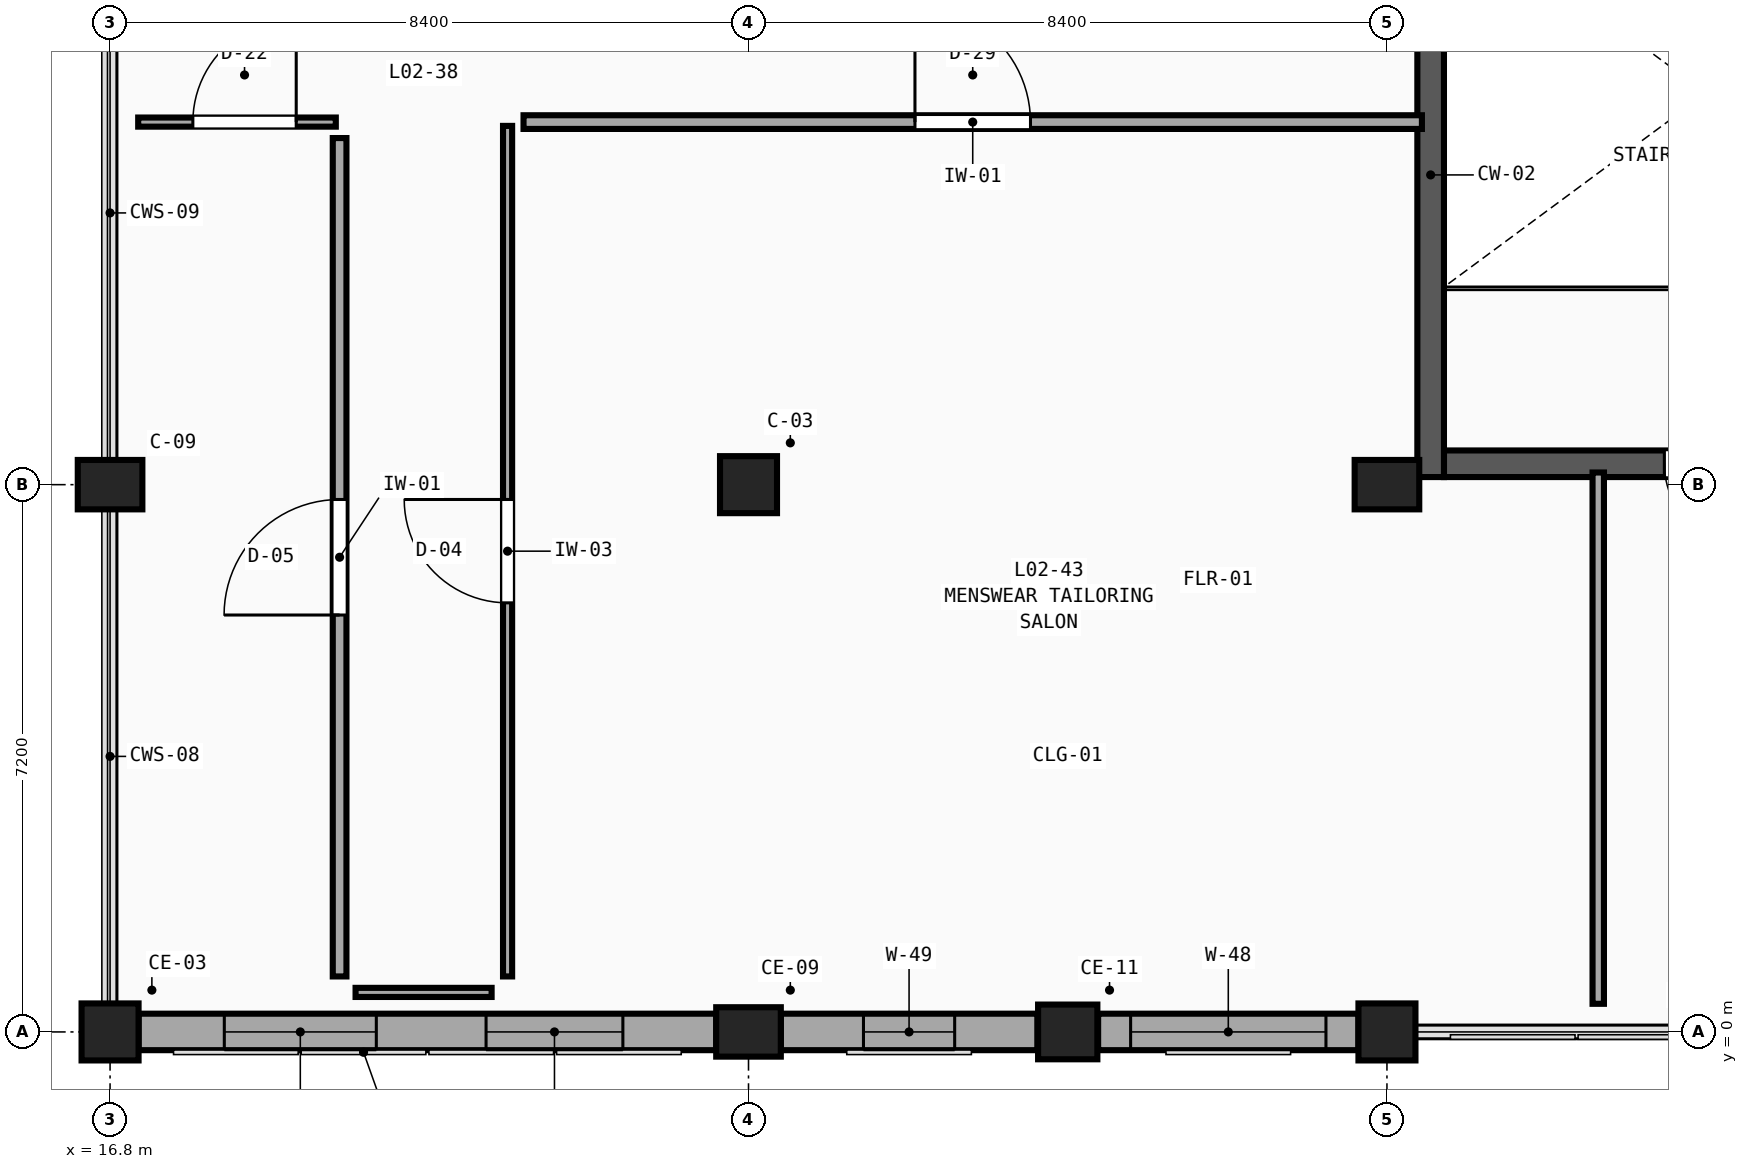
"""IFC4 building model, lengths in metres.
Left out: names, types, materials, properties, quantities, classifications, styles, units other than length and angle.
Written with IfcOpenShell. Run it as: python <this file> out.ifc"""

import sys

from ifc_helpers import new_model, si_unit, direction, frame, frame_2d, origin, origin_2d, place, context, subcontext, project, spatial, rectangle, extrude, element, fill, save


model = new_model("IFC4")
c1 = context("Model", 3, precision=1e-05, world=origin(), true_north=direction((0.0, 1.0)))
c2 = subcontext(c1, "Body", "Model", "MODEL_VIEW")
j1 = project(units=[si_unit("LENGTHUNIT", "METRE"), si_unit("PLANEANGLEUNIT", "RADIAN")], contexts=[c1])
p1 = place(None, origin())
s1 = spatial("IfcSite", under=j1, at=p1, CompositionType="ELEMENT")
p2 = place(p1, origin())
s2 = spatial("IfcBuilding", under=s1, at=p2, CompositionType="ELEMENT")
p3 = place(p2, frame((0.0, 0.0, 9.9)))
s3 = spatial("IfcBuildingStorey", under=s2, at=p3, CompositionType="ELEMENT", Elevation=9.9)
p4 = place(p3, frame((16.8, 0.0, 0.0), z_axis=(0.0, 0.0, 1.0), x_axis=(1.0, 0.0, 0.0)))
e1 = element("IfcColumn", 1, at=p4, inside=s3, PredefinedType="COLUMN", context=c2, shape_type="SweptSolid", body=[
    extrude(rectangle(XDim=0.75, YDim=0.75, at=origin_2d()), origin(), (0.0, 0.0, 1.0), 4.5),
])
for number, where, z_axis, x_axis in (
    (2, (16.8, 7.2, 0.0), (0.0, 0.0, 1.0), (1.0, 0.0, 0.0)),
    (3, (25.2, 0.0, 0.0), (0.0, 0.0, 1.0), (1.0, 0.0, 0.0)),
):
    element("IfcColumn", number, at=place(p3, frame(where, z_axis=z_axis, x_axis=x_axis)), inside=s3, PredefinedType="COLUMN", context=c2, shape_type="SweptSolid", body=[
        extrude(rectangle(XDim=0.85, YDim=0.65, at=origin_2d()), origin(), (0.0, 0.0, 1.0), 4.5),
    ])
for number, where, z_axis, x_axis in (
    (4, (25.2, 7.2, 0.0), (0.0, 0.0, 1.0), (1.0, 0.0, 0.0)),
    (5, (33.6, 0.0, 0.0), (0.0, 0.0, 1.0), (1.0, 0.0, 0.0)),
):
    element("IfcColumn", number, at=place(p3, frame(where, z_axis=z_axis, x_axis=x_axis)), inside=s3, PredefinedType="COLUMN", context=c2, shape_type="SweptSolid", body=[
        extrude(rectangle(XDim=0.75, YDim=0.75, at=origin_2d()), origin(), (0.0, 0.0, 1.0), 4.5),
    ])
p5 = place(p3, frame((33.6, 7.2, 0.0), z_axis=(0.0, 0.0, 1.0), x_axis=(1.0, 0.0, 0.0)))
e6 = element("IfcColumn", 6, at=p5, inside=s3, PredefinedType="COLUMN", context=c2, shape_type="SweptSolid", body=[
    extrude(rectangle(XDim=0.85, YDim=0.65, at=origin_2d()), origin(), (0.0, 0.0, 1.0), 4.5),
])
p6 = place(p3, frame((29.4, 0.0, 0.0), z_axis=(0.0, 0.0, 1.0), x_axis=(1.0, 0.0, 0.0)))
e7 = element("IfcColumn", 7, at=p6, inside=s3, PredefinedType="PILASTER", context=c2, shape_type="SweptSolid", body=[
    extrude(rectangle(XDim=0.78, YDim=0.72, at=origin_2d()), origin(), (0.0, 0.0, 1.0), 4.5),
])
p7 = place(p3, frame((24.775, 0.0, 0.0), z_axis=(0.0, 0.0, 1.0), x_axis=(-1.0, 0.0, 0.0)))
e8 = element("IfcWall", 8, at=p7, inside=s3, PredefinedType="SOLIDWALL", context=c2, shape_type="SweptSolid", body=[
    extrude(rectangle(XDim=7.6, YDim=0.48, at=frame_2d((3.8, 0.0))), origin(), (0.0, 0.0, 1.0), 3.63),
])
p8 = place(p7, frame((1.228, 0.0, 0.75)))
e9 = element("IfcOpeningElement", 9, at=p8, cuts=e8, PredefinedType="OPENING", context=c2, shape_type="SweptSolid", body=[
    extrude(rectangle(XDim=1.8, YDim=2.73, at=frame_2d((0.9, 1.365))), frame((0.0, 0.26, 0.0), z_axis=(0.0, -1.0, 0.0), x_axis=(1.0, 0.0, 0.0)), (0.0, 0.0, 1.0), 0.52),
])
p9 = place(p7, frame((4.472, 0.0, 0.75)))
e10 = element("IfcOpeningElement", 10, at=p9, cuts=e8, PredefinedType="OPENING", context=c2, shape_type="SweptSolid", body=[
    extrude(rectangle(XDim=2.0, YDim=2.73, at=frame_2d((1.0, 1.365))), frame((0.0, 0.26, 0.0), z_axis=(0.0, -1.0, 0.0), x_axis=(1.0, 0.0, 0.0)), (0.0, 0.0, 1.0), 0.52),
])
p10 = place(p3, frame((33.225, 0.0, 0.0), z_axis=(0.0, 0.0, 1.0), x_axis=(-1.0, 0.0, 0.0)))
e11 = element("IfcWall", 11, at=p10, inside=s3, PredefinedType="SOLIDWALL", context=c2, shape_type="SweptSolid", body=[
    extrude(rectangle(XDim=3.425, YDim=0.48, at=frame_2d((1.712, 0.0))), origin(), (0.0, 0.0, 1.0), 3.63),
])
p11 = place(p10, frame((0.427, 0.0, 0.75)))
e12 = element("IfcOpeningElement", 12, at=p11, cuts=e11, PredefinedType="OPENING", context=c2, shape_type="SweptSolid", body=[
    extrude(rectangle(XDim=2.57, YDim=2.73, at=frame_2d((1.285, 1.365))), frame((0.0, 0.26, 0.0), z_axis=(0.0, -1.0, 0.0), x_axis=(1.0, 0.0, 0.0)), (0.0, 0.0, 1.0), 0.52),
])
p12 = place(p3, frame((29.0, 0.0, 0.0), z_axis=(0.0, 0.0, 1.0), x_axis=(-1.0, 0.0, 0.0)))
e13 = element("IfcWall", 13, at=p12, inside=s3, PredefinedType="SOLIDWALL", context=c2, shape_type="SweptSolid", body=[
    extrude(rectangle(XDim=3.375, YDim=0.48, at=frame_2d((1.688, 0.0))), origin(), (0.0, 0.0, 1.0), 3.63),
])
p13 = place(p12, frame((1.087, 0.0, 0.75)))
e14 = element("IfcOpeningElement", 14, at=p13, cuts=e13, PredefinedType="OPENING", context=c2, shape_type="SweptSolid", body=[
    extrude(rectangle(XDim=1.2, YDim=2.73, at=frame_2d((0.6, 1.365))), frame((0.0, 0.26, 0.0), z_axis=(0.0, -1.0, 0.0), x_axis=(1.0, 0.0, 0.0)), (0.0, 0.0, 1.0), 0.52),
])
p14 = place(p3, frame((41.25, 7.475, 0.0), z_axis=(0.0, 0.0, 1.0), x_axis=(-1.0, 0.0, 0.0)))
e15 = element("IfcWall", 15, at=p14, inside=s3, PredefinedType="SHEAR", context=c2, shape_type="SweptSolid", body=[
    extrude(rectangle(XDim=6.9, YDim=0.35, at=frame_2d((3.45, 0.0))), origin(), (0.0, 0.0, 1.0), 4.5),
])
p15 = place(p14, frame((2.9, 0.0, 0.0)))
e16 = element("IfcOpeningElement", 16, at=p15, cuts=e15, PredefinedType="OPENING", context=c2, shape_type="SweptSolid", body=[
    extrude(rectangle(XDim=1.1, YDim=2.2, at=frame_2d((0.55, 1.1))), frame((0.0, 0.195, 0.0), z_axis=(0.0, -1.0, 0.0), x_axis=(1.0, 0.0, 0.0)), (0.0, 0.0, 1.0), 0.39),
])
p16 = place(p3, frame((34.175, 15.25, 0.0), z_axis=(0.0, 0.0, 1.0), x_axis=(0.0, -1.0, 0.0)))
e17 = element("IfcWall", 17, at=p16, inside=s3, PredefinedType="SHEAR", context=c2, shape_type="SweptSolid", body=[
    extrude(rectangle(XDim=7.95, YDim=0.35, at=frame_2d((3.975, 0.0))), origin(), (0.0, 0.0, 1.0), 4.5),
])
p17 = place(p3, frame((22.24, 11.97, 0.0), z_axis=(0.0, 0.0, 1.0), x_axis=(1.0, 0.0, 0.0)))
e18 = element("IfcWall", 18, at=p17, inside=s3, PredefinedType="PARTITIONING", context=c2, shape_type="SweptSolid", body=[
    extrude(rectangle(XDim=11.82, YDim=0.18, at=frame_2d((5.91, 0.0))), origin(), (0.0, 0.0, 1.0), 4.18),
])
p18 = place(p17, frame((5.15, 0.0, 0.0)))
e19 = element("IfcOpeningElement", 19, at=p18, cuts=e18, PredefinedType="OPENING", context=c2, shape_type="SweptSolid", body=[
    extrude(rectangle(XDim=1.52, YDim=2.37, at=frame_2d((0.76, 1.185))), frame((0.0, 0.11, 0.0), z_axis=(0.0, -1.0, 0.0), x_axis=(1.0, 0.0, 0.0)), (0.0, 0.0, 1.0), 0.22),
])
p19 = place(p3, frame((22.03, 0.73, 0.0), z_axis=(0.0, 0.0, 1.0), x_axis=(0.0, 1.0, 0.0)))
e20 = element("IfcWall", 20, at=p19, inside=s3, PredefinedType="PARTITIONING", context=c2, shape_type="SweptSolid", body=[
    extrude(rectangle(XDim=11.19, YDim=0.12, at=frame_2d((5.595, 0.0))), origin(), (0.0, 0.0, 1.0), 4.18),
])
p20 = place(p19, frame((4.915, 0.0, 0.0)))
e21 = element("IfcOpeningElement", 21, at=p20, cuts=e20, PredefinedType="OPENING", context=c2, shape_type="SweptSolid", body=[
    extrude(rectangle(XDim=1.36, YDim=2.05, at=frame_2d((0.68, 1.025))), frame((0.0, 0.08, 0.0), z_axis=(0.0, -1.0, 0.0), x_axis=(1.0, 0.0, 0.0)), (0.0, 0.0, 1.0), 0.16),
])
p21 = place(p3, frame((19.82, 0.73, 0.0), z_axis=(0.0, 0.0, 1.0), x_axis=(0.0, 1.0, 0.0)))
e22 = element("IfcWall", 22, at=p21, inside=s3, PredefinedType="PARTITIONING", context=c2, shape_type="SweptSolid", body=[
    extrude(rectangle(XDim=11.03, YDim=0.18, at=frame_2d((5.515, 0.0))), origin(), (0.0, 0.0, 1.0), 4.18),
])
p22 = place(p21, frame((4.755, 0.0, 0.0)))
e23 = element("IfcOpeningElement", 23, at=p22, cuts=e22, PredefinedType="OPENING", context=c2, shape_type="SweptSolid", body=[
    extrude(rectangle(XDim=1.52, YDim=2.05, at=frame_2d((0.76, 1.025))), frame((0.0, 0.11, 0.0), z_axis=(0.0, -1.0, 0.0), x_axis=(1.0, 0.0, 0.0)), (0.0, 0.0, 1.0), 0.22),
])
p23 = place(p3, frame((17.17, 11.97, 0.0), z_axis=(0.0, 0.0, 1.0), x_axis=(1.0, 0.0, 0.0)))
e24 = element("IfcWall", 24, at=p23, inside=s3, PredefinedType="PARTITIONING", context=c2, shape_type="SweptSolid", body=[
    extrude(rectangle(XDim=2.6, YDim=0.12, at=frame_2d((1.3, 0.0))), origin(), (0.0, 0.0, 1.0), 4.18),
])
p24 = place(p23, frame((0.719, 0.0, 0.0)))
e25 = element("IfcOpeningElement", 25, at=p24, cuts=e24, PredefinedType="OPENING", context=c2, shape_type="SweptSolid", body=[
    extrude(rectangle(XDim=1.36, YDim=2.29, at=frame_2d((0.68, 1.145))), frame((0.0, 0.08, 0.0), z_axis=(0.0, -1.0, 0.0), x_axis=(1.0, 0.0, 0.0)), (0.0, 0.0, 1.0), 0.16),
])
p25 = place(p3, frame((20.03, 0.52, 0.0), z_axis=(0.0, 0.0, 1.0), x_axis=(1.0, 0.0, 0.0)))
e26 = element("IfcWall", 26, at=p25, inside=s3, PredefinedType="PARTITIONING", context=c2, shape_type="SweptSolid", body=[
    extrude(rectangle(XDim=1.79, YDim=0.12, at=frame_2d((0.895, 0.0))), origin(), (0.0, 0.0, 1.0), 3.63),
])
p26 = place(p3, frame((36.38, 0.37, 0.0), z_axis=(0.0, 0.0, 1.0), x_axis=(0.0, 1.0, 0.0)))
e27 = element("IfcWall", 27, at=p26, inside=s3, PredefinedType="PARTITIONING", context=c2, shape_type="SweptSolid", body=[
    extrude(rectangle(XDim=6.99, YDim=0.15, at=frame_2d((3.495, 0.0))), origin(), (0.0, 0.0, 1.0), 4.18),
])
p27 = place(p8, origin())
e28 = element("IfcWindow", 28, at=p27, inside=s3, PartitioningType="DOUBLE_PANEL_VERTICAL", PredefinedType="WINDOW", context=c2, shape_type="SweptSolid", body=[
    extrude(rectangle(XDim=1.8, YDim=2.73, at=frame_2d((0.9, 1.365))), frame((0.0, 0.03, 0.0), z_axis=(0.0, -1.0, 0.0), x_axis=(1.0, 0.0, 0.0)), (0.0, 0.0, 1.0), 0.06),
])
fill(e9, e28)
p28 = place(p9, origin())
e29 = element("IfcWindow", 29, at=p28, inside=s3, PartitioningType="TRIPLE_PANEL_VERTICAL", PredefinedType="WINDOW", context=c2, shape_type="SweptSolid", body=[
    extrude(rectangle(XDim=2.0, YDim=2.73, at=frame_2d((1.0, 1.365))), frame((0.0, 0.03, 0.0), z_axis=(0.0, -1.0, 0.0), x_axis=(1.0, 0.0, 0.0)), (0.0, 0.0, 1.0), 0.06),
])
fill(e10, e29)
p29 = place(p11, origin())
e30 = element("IfcWindow", 30, at=p29, inside=s3, PartitioningType="TRIPLE_PANEL_VERTICAL", PredefinedType="WINDOW", context=c2, shape_type="SweptSolid", body=[
    extrude(rectangle(XDim=2.57, YDim=2.73, at=frame_2d((1.285, 1.365))), frame((0.0, 0.03, 0.0), z_axis=(0.0, -1.0, 0.0), x_axis=(1.0, 0.0, 0.0)), (0.0, 0.0, 1.0), 0.06),
])
fill(e12, e30)
p30 = place(p13, origin())
e31 = element("IfcWindow", 31, at=p30, inside=s3, PartitioningType="SINGLE_PANEL", PredefinedType="WINDOW", context=c2, shape_type="SweptSolid", body=[
    extrude(rectangle(XDim=1.2, YDim=2.73, at=frame_2d((0.6, 1.365))), frame((0.0, 0.03, 0.0), z_axis=(0.0, -1.0, 0.0), x_axis=(1.0, 0.0, 0.0)), (0.0, 0.0, 1.0), 0.06),
])
fill(e14, e31)
p31 = place(p15, origin())
e32 = element("IfcDoor", 32, at=p31, inside=s3, OperationType="SINGLE_SWING_LEFT", PredefinedType="DOOR", context=c2, shape_type="SweptSolid", body=[
    extrude(rectangle(XDim=1.1, YDim=2.2, at=frame_2d((0.55, 1.1))), frame((0.0, 0.025, 0.0), z_axis=(0.0, -1.0, 0.0), x_axis=(1.0, 0.0, 0.0)), (0.0, 0.0, 1.0), 0.05),
])
fill(e16, e32)
p32 = place(p18, origin())
e33 = element("IfcDoor", 33, at=p32, inside=s3, OperationType="SINGLE_SWING_LEFT", PredefinedType="DOOR", context=c2, shape_type="SweptSolid", body=[
    extrude(rectangle(XDim=1.52, YDim=2.37, at=frame_2d((0.76, 1.185))), frame((0.0, 0.025, 0.0), z_axis=(0.0, -1.0, 0.0), x_axis=(1.0, 0.0, 0.0)), (0.0, 0.0, 1.0), 0.05),
])
fill(e19, e33)
p33 = place(p20, origin())
e34 = element("IfcDoor", 34, at=p33, inside=s3, OperationType="SINGLE_SWING_RIGHT", PredefinedType="DOOR", context=c2, shape_type="SweptSolid", body=[
    extrude(rectangle(XDim=1.36, YDim=2.05, at=frame_2d((0.68, 1.025))), frame((0.0, 0.025, 0.0), z_axis=(0.0, -1.0, 0.0), x_axis=(1.0, 0.0, 0.0)), (0.0, 0.0, 1.0), 0.05),
])
fill(e21, e34)
p34 = place(p22, origin())
e35 = element("IfcDoor", 35, at=p34, inside=s3, OperationType="SINGLE_SWING_LEFT", PredefinedType="DOOR", context=c2, shape_type="SweptSolid", body=[
    extrude(rectangle(XDim=1.52, YDim=2.05, at=frame_2d((0.76, 1.025))), frame((0.0, 0.025, 0.0), z_axis=(0.0, -1.0, 0.0), x_axis=(1.0, 0.0, 0.0)), (0.0, 0.0, 1.0), 0.05),
])
fill(e23, e35)
p35 = place(p24, origin())
e36 = element("IfcDoor", 36, at=p35, inside=s3, OperationType="SINGLE_SWING_RIGHT", PredefinedType="DOOR", context=c2, shape_type="SweptSolid", body=[
    extrude(rectangle(XDim=1.36, YDim=2.29, at=frame_2d((0.68, 1.145))), frame((0.0, 0.025, 0.0), z_axis=(0.0, -1.0, 0.0), x_axis=(1.0, 0.0, 0.0)), (0.0, 0.0, 1.0), 0.05),
])
fill(e25, e36)
save(model, sys.argv[1])
